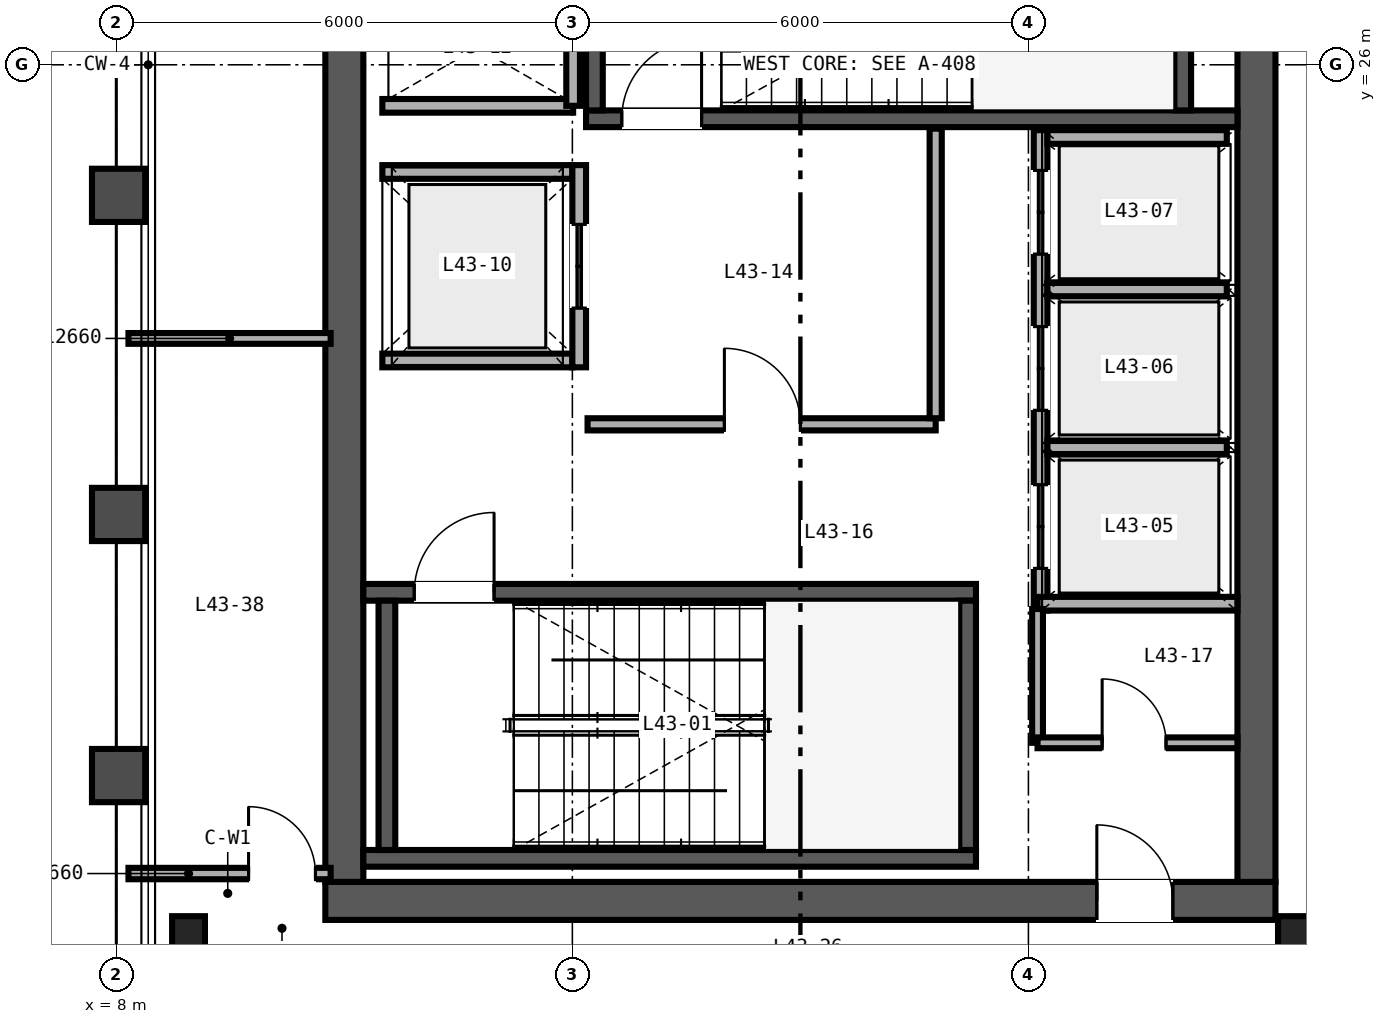
"""IFC4 building model, lengths in metres.
Left out: names, types, materials, properties, quantities, classifications, styles, units other than length and angle.
Written with IfcOpenShell. Run it as: python <this file> out.ifc"""

import sys

from ifc_helpers import new_model, si_unit, direction, frame, frame_2d, origin, origin_2d, place, context, subcontext, project, spatial, rectangle, i_section, extrude, source, transform, mapped, element, fill, save


model = new_model("IFC4")
c1 = context("Model", 3, precision=1e-05, world=origin(), true_north=direction((0.0, 1.0)))
c2 = subcontext(c1, "Body", "Model", "MODEL_VIEW")
j1 = project(units=[si_unit("LENGTHUNIT", "METRE"), si_unit("PLANEANGLEUNIT", "RADIAN")], contexts=[c1])
p1 = place(None, origin())
s1 = spatial("IfcSite", under=j1, at=p1, CompositionType="ELEMENT")
p2 = place(p1, origin())
s2 = spatial("IfcBuilding", under=s1, at=p2, CompositionType="ELEMENT")
p3 = place(p2, frame((0.0, 0.0, 174.0)))
s3 = spatial("IfcBuildingStorey", under=s2, at=p3, CompositionType="ELEMENT", Elevation=174.0)
p4 = place(p3, frame((10.75, 15.0, 0.0), z_axis=(0.0, 0.0, 1.0), x_axis=(1.0, 0.0, 0.0)))
e1 = element("IfcWall", 1, at=p4, inside=s3, PredefinedType="SHEAR", context=c2, shape_type="SweptSolid", body=[
    extrude(rectangle(XDim=12.5, YDim=0.5, at=frame_2d((6.25, 0.0))), origin(), (0.0, 0.0, 1.0), 3.37),
])
p5 = place(p4, frame((10.15, 0.0, 0.0)))
e2 = element("IfcOpeningElement", 2, at=p5, cuts=e1, PredefinedType="OPENING", context=c2, shape_type="SweptSolid", body=[
    extrude(rectangle(XDim=1.0, YDim=2.15, at=frame_2d((0.5, 1.075))), frame((0.0, 0.26, 0.0), z_axis=(0.0, -1.0, 0.0), x_axis=(1.0, 0.0, 0.0)), (0.0, 0.0, 1.0), 0.52),
])
for number, where, z_axis, x_axis in (
    (3, (11.0, 15.25, 0.0), (0.0, 0.0, 1.0), (0.0, 1.0, 0.0)),
    (4, (23.0, 15.25, 0.0), (0.0, 0.0, 1.0), (0.0, 1.0, 0.0)),
):
    element("IfcWall", number, at=place(p3, frame(where, z_axis=z_axis, x_axis=x_axis)), inside=s3, PredefinedType="SHEAR", context=c2, shape_type="SweptSolid", body=[
        extrude(rectangle(XDim=21.5, YDim=0.5, at=frame_2d((10.75, 0.0))), origin(), (0.0, 0.0, 1.0), 3.37),
    ])
p6 = place(p3, frame((11.25, 15.56, 0.0), z_axis=(0.0, 0.0, 1.0), x_axis=(1.0, 0.0, 0.0)))
e5 = element("IfcWall", 5, at=p6, inside=s3, PredefinedType="SHEAR", context=c2, shape_type="SweptSolid", body=[
    extrude(rectangle(XDim=8.06, YDim=0.22, at=frame_2d((4.03, 0.0))), origin(), (0.0, 0.0, 1.0), 3.4),
])
p7 = place(p3, frame((11.25, 19.06, 0.0), z_axis=(0.0, 0.0, 1.0), x_axis=(1.0, 0.0, 0.0)))
e6 = element("IfcWall", 6, at=p7, inside=s3, PredefinedType="SHEAR", context=c2, shape_type="SweptSolid", body=[
    extrude(rectangle(XDim=8.06, YDim=0.22, at=frame_2d((4.03, 0.0))), origin(), (0.0, 0.0, 1.0), 3.4),
])
p8 = place(p7, frame((0.67, 0.0, 0.0)))
e7 = element("IfcOpeningElement", 7, at=p8, cuts=e6, PredefinedType="OPENING", context=c2, shape_type="SweptSolid", body=[
    extrude(rectangle(XDim=1.05, YDim=2.15, at=frame_2d((0.525, 1.075))), frame((0.0, 0.12, 0.0), z_axis=(0.0, -1.0, 0.0), x_axis=(1.0, 0.0, 0.0)), (0.0, 0.0, 1.0), 0.24),
])
for number, where, z_axis, x_axis in (
    (8, (11.56, 15.67, 0.0), (0.0, 0.0, 1.0), (0.0, 1.0, 0.0)),
    (9, (19.2, 15.67, 0.0), (0.0, 0.0, 1.0), (0.0, 1.0, 0.0)),
):
    element("IfcWall", number, at=place(p3, frame(where, z_axis=z_axis, x_axis=x_axis)), inside=s3, PredefinedType="SHEAR", context=c2, shape_type="SweptSolid", body=[
        extrude(rectangle(XDim=3.28, YDim=0.22, at=frame_2d((1.64, 0.0))), origin(), (0.0, 0.0, 1.0), 3.4),
    ])
p9 = place(p3, frame((14.18, 25.29, 0.0), z_axis=(0.0, 0.0, 1.0), x_axis=(1.0, 0.0, 0.0)))
e10 = element("IfcWall", 10, at=p9, inside=s3, PredefinedType="SHEAR", context=c2, shape_type="SweptSolid", body=[
    extrude(rectangle(XDim=8.57, YDim=0.22, at=frame_2d((4.285, 0.0))), origin(), (0.0, 0.0, 1.0), 3.4),
])
p10 = place(p9, frame((0.47, 0.0, 0.0)))
e11 = element("IfcOpeningElement", 11, at=p10, cuts=e10, PredefinedType="OPENING", context=c2, shape_type="SweptSolid", body=[
    extrude(rectangle(XDim=1.05, YDim=2.15, at=frame_2d((0.525, 1.075))), frame((0.0, 0.12, 0.0), z_axis=(0.0, -1.0, 0.0), x_axis=(1.0, 0.0, 0.0)), (0.0, 0.0, 1.0), 0.24),
])
for number, where, z_axis, x_axis in (
    (12, (14.29, 25.4, 0.0), (0.0, 0.0, 1.0), (0.0, 1.0, 0.0)),
    (13, (22.03, 25.4, 0.0), (0.0, 0.0, 1.0), (0.0, 1.0, 0.0)),
):
    element("IfcWall", number, at=place(p3, frame(where, z_axis=z_axis, x_axis=x_axis)), inside=s3, PredefinedType="SHEAR", context=c2, shape_type="SweptSolid", body=[
        extrude(rectangle(XDim=3.28, YDim=0.22, at=frame_2d((1.64, 0.0))), origin(), (0.0, 0.0, 1.0), 3.4),
    ])
m1 = source(origin(), c2, "Body", "SweptSolid", [
    extrude(i_section(OverallWidth=0.432, OverallDepth=0.498, WebThickness=0.056, FlangeThickness=0.089, FilletRadius=0.025, at=origin_2d()), origin(), (0.0, 0.0, 1.0), 3.37),
])
for number, where, z_axis, x_axis in (
    (14, (8.95, 14.55, 0.0), (0.0, 0.0, 1.0), (1.0, 0.0, 0.0)),
    (15, (23.5, 14.55, 0.0), (0.0, 0.0, 1.0), (1.0, 0.0, 0.0)),
):
    element("IfcColumn", number, at=place(p3, frame(where, z_axis=z_axis, x_axis=x_axis)), inside=s3, PredefinedType="COLUMN", context=c2, shape_type="MappedRepresentation", body=[
        mapped(m1, transform((0.0, 0.0, 0.0), scale=1.0)),
    ])
p11 = place(p3, frame((20.16, 18.82, 0.0), z_axis=(0.0, 0.0, 1.0), x_axis=(0.0, 1.0, 0.0)))
e16 = element("IfcWall", 16, at=p11, inside=s3, PredefinedType="SOLIDWALL", context=c2, shape_type="SweptSolid", body=[
    extrude(rectangle(XDim=6.32, YDim=0.18, at=frame_2d((3.16, 0.0))), origin(), (0.0, 0.0, 1.0), 2.47),
])
p12 = place(p11, frame((0.555, 0.0, 0.0)))
e17 = element("IfcOpeningElement", 17, at=p12, cuts=e16, PredefinedType="OPENING", context=c2, shape_type="SweptSolid", body=[
    extrude(rectangle(XDim=1.1, YDim=2.2, at=frame_2d((0.55, 1.1))), frame((0.0, 0.1, 0.0), z_axis=(0.0, -1.0, 0.0), x_axis=(1.0, 0.0, 0.0)), (0.0, 0.0, 1.0), 0.2),
])
p13 = place(p11, frame((2.635, 0.0, 0.0)))
e18 = element("IfcOpeningElement", 18, at=p13, cuts=e16, PredefinedType="OPENING", context=c2, shape_type="SweptSolid", body=[
    extrude(rectangle(XDim=1.1, YDim=2.2, at=frame_2d((0.55, 1.1))), frame((0.0, 0.1, 0.0), z_axis=(0.0, -1.0, 0.0), x_axis=(1.0, 0.0, 0.0)), (0.0, 0.0, 1.0), 0.2),
])
p14 = place(p11, frame((4.69, 0.0, 0.0)))
e19 = element("IfcOpeningElement", 19, at=p14, cuts=e16, PredefinedType="OPENING", context=c2, shape_type="SweptSolid", body=[
    extrude(rectangle(XDim=1.1, YDim=2.2, at=frame_2d((0.55, 1.1))), frame((0.0, 0.1, 0.0), z_axis=(0.0, -1.0, 0.0), x_axis=(1.0, 0.0, 0.0)), (0.0, 0.0, 1.0), 0.2),
])
p15 = place(p3, frame((20.12, 18.91, 0.0), z_axis=(0.0, 0.0, 1.0), x_axis=(1.0, 0.0, 0.0)))
e20 = element("IfcWall", 20, at=p15, inside=s3, PredefinedType="SOLIDWALL", context=c2, shape_type="SweptSolid", body=[
    extrude(rectangle(XDim=2.63, YDim=0.18, at=frame_2d((1.315, 0.0))), origin(), (0.0, 0.0, 1.0), 3.37),
])
p16 = place(p3, frame((20.25, 25.05, 0.0), z_axis=(0.0, 0.0, 1.0), x_axis=(1.0, 0.0, 0.0)))
e21 = element("IfcWall", 21, at=p16, inside=s3, PredefinedType="SOLIDWALL", context=c2, shape_type="SweptSolid", body=[
    extrude(rectangle(XDim=2.36, YDim=0.18, at=frame_2d((1.18, 0.0))), origin(), (0.0, 0.0, 1.0), 3.37),
])
p17 = place(p3, frame((20.25, 20.965, 0.0), z_axis=(0.0, 0.0, 1.0), x_axis=(1.0, 0.0, 0.0)))
e22 = element("IfcWall", 22, at=p17, inside=s3, PredefinedType="SOLIDWALL", context=c2, shape_type="SweptSolid", body=[
    extrude(rectangle(XDim=2.36, YDim=0.18, at=frame_2d((1.18, 0.0))), origin(), (0.0, 0.0, 1.0), 2.47),
])
p18 = place(p3, frame((20.25, 23.045, 0.0), z_axis=(0.0, 0.0, 1.0), x_axis=(1.0, 0.0, 0.0)))
e23 = element("IfcWall", 23, at=p18, inside=s3, PredefinedType="SOLIDWALL", context=c2, shape_type="SweptSolid", body=[
    extrude(rectangle(XDim=2.36, YDim=0.18, at=frame_2d((1.18, 0.0))), origin(), (0.0, 0.0, 1.0), 3.37),
])
for number, where, z_axis, x_axis in (
    (24, (11.5, 22.11, 0.0), (0.0, 0.0, 1.0), (1.0, 0.0, 0.0)),
    (25, (11.5, 24.59, 0.0), (0.0, 0.0, 1.0), (1.0, 0.0, 0.0)),
):
    element("IfcWall", number, at=place(p3, frame(where, z_axis=z_axis, x_axis=x_axis)), inside=s3, PredefinedType="SOLIDWALL", context=c2, shape_type="SweptSolid", body=[
        extrude(rectangle(XDim=2.5, YDim=0.18, at=frame_2d((1.25, 0.0))), origin(), (0.0, 0.0, 1.0), 3.37),
    ])
p19 = place(p3, frame((14.09, 22.02, 0.0), z_axis=(0.0, 0.0, 1.0), x_axis=(0.0, 1.0, 0.0)))
e26 = element("IfcWall", 26, at=p19, inside=s3, PredefinedType="SOLIDWALL", context=c2, shape_type="SweptSolid", body=[
    extrude(rectangle(XDim=2.66, YDim=0.18, at=frame_2d((1.33, 0.0))), origin(), (0.0, 0.0, 1.0), 3.37),
])
p20 = place(p19, frame((0.78, 0.0, 0.0)))
e27 = element("IfcOpeningElement", 27, at=p20, cuts=e26, PredefinedType="OPENING", context=c2, shape_type="SweptSolid", body=[
    extrude(rectangle(XDim=1.1, YDim=2.2, at=frame_2d((0.55, 1.1))), frame((0.0, 0.1, 0.0), z_axis=(0.0, -1.0, 0.0), x_axis=(1.0, 0.0, 0.0)), (0.0, 0.0, 1.0), 0.2),
])
p21 = place(p3, frame((11.5, 25.46, 0.0), z_axis=(0.0, 0.0, 1.0), x_axis=(1.0, 0.0, 0.0)))
e28 = element("IfcWall", 28, at=p21, inside=s3, PredefinedType="SOLIDWALL", context=c2, shape_type="SweptSolid", body=[
    extrude(rectangle(XDim=2.51, YDim=0.18, at=frame_2d((1.255, 0.0))), origin(), (0.0, 0.0, 1.0), 3.37),
])
p22 = place(p3, frame((14.01, 25.46, 0.0), z_axis=(0.0, 0.0, 1.0), x_axis=(0.0, 1.0, 0.0)))
e29 = element("IfcWall", 29, at=p22, inside=s3, PredefinedType="SOLIDWALL", context=c2, shape_type="SweptSolid", body=[
    extrude(rectangle(XDim=3.08, YDim=0.18, at=frame_2d((1.54, 0.0))), origin(), (0.0, 0.0, 1.0), 3.37),
])
p23 = place(p3, frame((14.2, 21.27, 0.0), z_axis=(0.0, 0.0, 1.0), x_axis=(1.0, 0.0, 0.0)))
e30 = element("IfcWall", 30, at=p23, inside=s3, PredefinedType="PARTITIONING", context=c2, shape_type="SweptSolid", body=[
    extrude(rectangle(XDim=4.58, YDim=0.16, at=frame_2d((2.29, 0.0))), origin(), (0.0, 0.0, 1.0), 3.37),
])
p24 = place(p23, frame((1.8, 0.0, 0.0)))
e31 = element("IfcOpeningElement", 31, at=p24, cuts=e30, PredefinedType="OPENING", context=c2, shape_type="SweptSolid", body=[
    extrude(rectangle(XDim=1.0, YDim=2.15, at=frame_2d((0.5, 1.075))), frame((0.0, 0.09, 0.0), z_axis=(0.0, -1.0, 0.0), x_axis=(1.0, 0.0, 0.0)), (0.0, 0.0, 1.0), 0.18),
])
p25 = place(p3, frame((18.78, 21.35, 0.0), z_axis=(0.0, 0.0, 1.0), x_axis=(0.0, 1.0, 0.0)))
e32 = element("IfcWall", 32, at=p25, inside=s3, PredefinedType="PARTITIONING", context=c2, shape_type="SweptSolid", body=[
    extrude(rectangle(XDim=3.81, YDim=0.16, at=frame_2d((1.905, 0.0))), origin(), (0.0, 0.0, 1.0), 3.37),
])
p26 = place(p3, frame((20.12, 17.08, 0.0), z_axis=(0.0, 0.0, 1.0), x_axis=(0.0, 1.0, 0.0)))
e33 = element("IfcWall", 33, at=p26, inside=s3, PredefinedType="PARTITIONING", context=c2, shape_type="SweptSolid", body=[
    extrude(rectangle(XDim=1.76, YDim=0.142, at=frame_2d((0.88, 0.0))), origin(), (0.0, 0.0, 1.0), 3.37),
])
p27 = place(p3, frame((20.12, 17.08, 0.0), z_axis=(0.0, 0.0, 1.0), x_axis=(1.0, 0.0, 0.0)))
e34 = element("IfcWall", 34, at=p27, inside=s3, PredefinedType="PARTITIONING", context=c2, shape_type="SweptSolid", body=[
    extrude(rectangle(XDim=2.63, YDim=0.142, at=frame_2d((1.315, 0.0))), origin(), (0.0, 0.0, 1.0), 3.37),
])
p28 = place(p27, frame((0.85, 0.0, 0.0)))
e35 = element("IfcOpeningElement", 35, at=p28, cuts=e34, PredefinedType="OPENING", context=c2, shape_type="SweptSolid", body=[
    extrude(rectangle(XDim=0.84, YDim=2.1, at=frame_2d((0.42, 1.05))), frame((0.0, 0.081, 0.0), z_axis=(0.0, -1.0, 0.0), x_axis=(1.0, 0.0, 0.0)), (0.0, 0.0, 1.0), 0.162),
])
p29 = place(p3, frame((8.16, 15.36, 0.0), z_axis=(0.0, 0.0, 1.0), x_axis=(1.0, 0.0, 0.0)))
e36 = element("IfcWall", 36, at=p29, inside=s3, PredefinedType="PARTITIONING", context=c2, shape_type="SweptSolid", body=[
    extrude(rectangle(XDim=2.66, YDim=0.15, at=frame_2d((1.33, 0.0))), origin(), (0.0, 0.0, 1.0), 2.591),
])
p30 = place(p29, frame((1.58, 0.0, 0.0)))
e37 = element("IfcOpeningElement", 37, at=p30, cuts=e36, PredefinedType="OPENING", context=c2, shape_type="SweptSolid", body=[
    extrude(rectangle(XDim=0.88, YDim=2.15, at=frame_2d((0.44, 1.075))), frame((0.0, 0.085, 0.0), z_axis=(0.0, -1.0, 0.0), x_axis=(1.0, 0.0, 0.0)), (0.0, 0.0, 1.0), 0.17),
])
p31 = place(p3, frame((8.16, 22.4, 0.0), z_axis=(0.0, 0.0, 1.0), x_axis=(1.0, 0.0, 0.0)))
e38 = element("IfcWall", 38, at=p31, inside=s3, PredefinedType="PARTITIONING", context=c2, shape_type="SweptSolid", body=[
    extrude(rectangle(XDim=2.66, YDim=0.142, at=frame_2d((1.33, 0.0))), origin(), (0.0, 0.0, 1.0), 2.591),
])
m2 = source(origin(), c2, "Body", "SweptSolid", [
    extrude(rectangle(XDim=1.05, YDim=2.15, at=frame_2d((0.525, 1.075))), frame((0.0, 0.025, 0.0), z_axis=(0.0, -1.0, 0.0), x_axis=(1.0, 0.0, 0.0)), (0.0, 0.0, 1.0), 0.05),
])
p32 = place(p8, origin())
e39 = element("IfcDoor", 39, at=p32, inside=s3, OperationType="SINGLE_SWING_RIGHT", PredefinedType="DOOR", context=c2, shape_type="MappedRepresentation", body=[
    mapped(m2, transform((0.0, 0.0, 0.0), scale=1.0)),
])
fill(e7, e39)
p33 = place(p10, origin())
e40 = element("IfcDoor", 40, at=p33, inside=s3, OperationType="SINGLE_SWING_RIGHT", PredefinedType="DOOR", context=c2, shape_type="MappedRepresentation", body=[
    mapped(m2, transform((0.0, 0.0, 0.0), scale=1.0)),
])
fill(e11, e40)
m3 = source(origin(), c2, "Body", "SweptSolid", [
    extrude(rectangle(XDim=1.1, YDim=2.2, at=frame_2d((0.55, 1.1))), frame((0.0, 0.025, 0.0), z_axis=(0.0, -1.0, 0.0), x_axis=(1.0, 0.0, 0.0)), (0.0, 0.0, 1.0), 0.05),
])
p34 = place(p12, origin())
e41 = element("IfcDoor", 41, at=p34, inside=s3, OperationType="DOUBLE_DOOR_SLIDING", PredefinedType="DOOR", context=c2, shape_type="MappedRepresentation", body=[
    mapped(m3, transform((0.0, 0.0, 0.0), scale=1.0)),
])
fill(e17, e41)
p35 = place(p13, origin())
e42 = element("IfcDoor", 42, at=p35, inside=s3, OperationType="DOUBLE_DOOR_SLIDING", PredefinedType="DOOR", context=c2, shape_type="MappedRepresentation", body=[
    mapped(m3, transform((0.0, 0.0, 0.0), scale=1.0)),
])
fill(e18, e42)
p36 = place(p14, origin())
e43 = element("IfcDoor", 43, at=p36, inside=s3, OperationType="DOUBLE_DOOR_SLIDING", PredefinedType="DOOR", context=c2, shape_type="MappedRepresentation", body=[
    mapped(m3, transform((0.0, 0.0, 0.0), scale=1.0)),
])
fill(e19, e43)
p37 = place(p20, origin())
e44 = element("IfcDoor", 44, at=p37, inside=s3, OperationType="DOUBLE_DOOR_SLIDING", PredefinedType="DOOR", context=c2, shape_type="MappedRepresentation", body=[
    mapped(m3, transform((0.0, 0.0, 0.0), scale=1.0)),
])
fill(e27, e44)
m4 = source(origin(), c2, "Body", "SweptSolid", [
    extrude(rectangle(XDim=1.0, YDim=2.15, at=frame_2d((0.5, 1.075))), frame((0.0, 0.025, 0.0), z_axis=(0.0, -1.0, 0.0), x_axis=(1.0, 0.0, 0.0)), (0.0, 0.0, 1.0), 0.05),
])
p38 = place(p24, origin())
e45 = element("IfcDoor", 45, at=p38, inside=s3, OperationType="SINGLE_SWING_LEFT", PredefinedType="DOOR", context=c2, shape_type="MappedRepresentation", body=[
    mapped(m4, transform((0.0, 0.0, 0.0), scale=1.0)),
])
fill(e31, e45)
m5 = source(origin(), c2, "Body", "SweptSolid", [
    extrude(rectangle(XDim=0.84, YDim=2.1, at=frame_2d((0.42, 1.05))), frame((0.0, 0.025, 0.0), z_axis=(0.0, -1.0, 0.0), x_axis=(1.0, 0.0, 0.0)), (0.0, 0.0, 1.0), 0.05),
])
p39 = place(p28, origin())
e46 = element("IfcDoor", 46, at=p39, inside=s3, OperationType="SINGLE_SWING_LEFT", PredefinedType="DOOR", context=c2, shape_type="MappedRepresentation", body=[
    mapped(m5, transform((0.0, 0.0, 0.0), scale=1.0)),
])
fill(e35, e46)
p40 = place(p5, origin())
e47 = element("IfcDoor", 47, at=p40, inside=s3, OperationType="SINGLE_SWING_LEFT", PredefinedType="DOOR", context=c2, shape_type="MappedRepresentation", body=[
    mapped(m4, transform((0.0, 0.0, 0.0), scale=1.0)),
])
fill(e2, e47)
m6 = source(origin(), c2, "Body", "SweptSolid", [
    extrude(rectangle(XDim=0.88, YDim=2.15, at=frame_2d((0.44, 1.075))), frame((0.0, 0.025, 0.0), z_axis=(0.0, -1.0, 0.0), x_axis=(1.0, 0.0, 0.0)), (0.0, 0.0, 1.0), 0.05),
])
p41 = place(p30, origin())
e48 = element("IfcDoor", 48, at=p41, inside=s3, OperationType="SINGLE_SWING_LEFT", PredefinedType="DOOR", context=c2, shape_type="MappedRepresentation", body=[
    mapped(m6, transform((0.0, 0.0, 0.0), scale=1.0)),
])
fill(e37, e48)
save(model, sys.argv[1])
